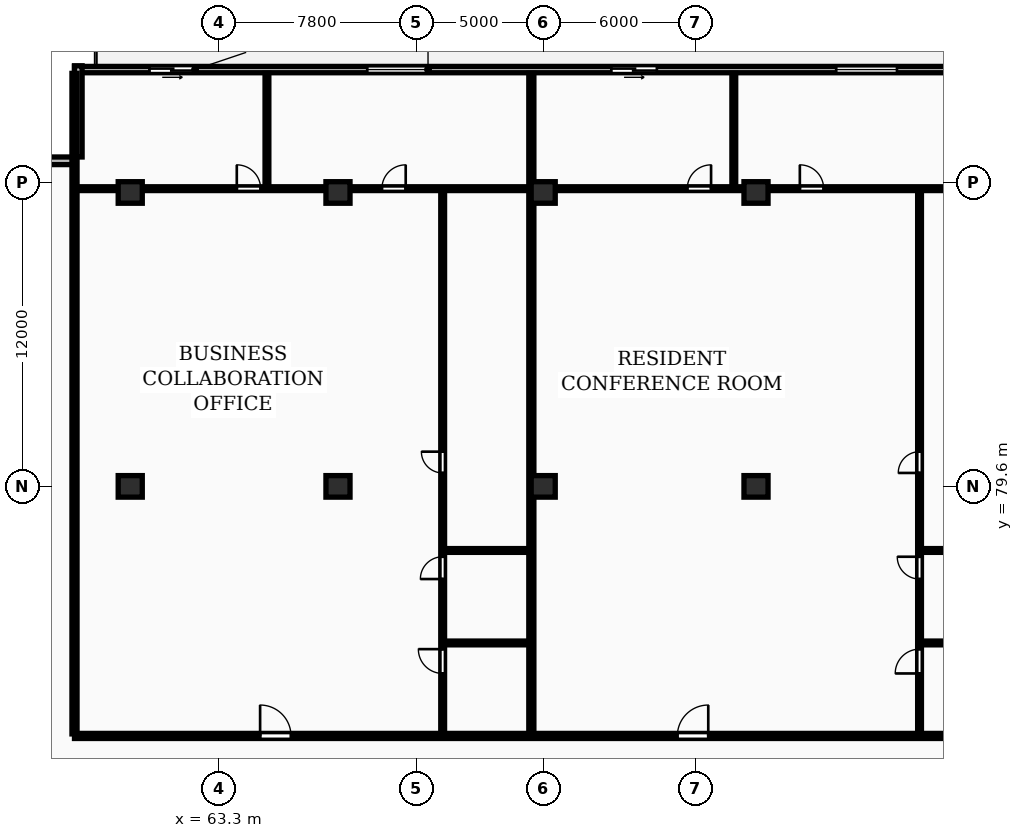
"""IFC4 building model, lengths in metres.
Left out: names, types, materials, properties, quantities, classifications, styles, units other than length and angle.
Written with IfcOpenShell. Run it as: python <this file> out.ifc"""

import sys

from ifc_helpers import new_model, si_unit, direction, frame, frame_2d, origin, origin_2d, place, context, subcontext, project, spatial, rectangle, extrude, element, fill, save


model = new_model("IFC4")
c1 = context("Model", 3, precision=1e-05, world=origin(), true_north=direction((0.0, 1.0)))
c2 = subcontext(c1, "Body", "Model", "MODEL_VIEW")
j1 = project(units=[si_unit("LENGTHUNIT", "METRE"), si_unit("PLANEANGLEUNIT", "RADIAN")], contexts=[c1])
p1 = place(None, origin())
s1 = spatial("IfcSite", under=j1, at=p1, CompositionType="ELEMENT")
p2 = place(p1, origin())
s2 = spatial("IfcBuilding", under=s1, at=p2, CompositionType="ELEMENT")
p3 = place(p2, frame((0.0, 0.0, 100.3)))
s3 = spatial("IfcBuildingStorey", under=s2, at=p3, CompositionType="ELEMENT", Elevation=100.3)
for number, where, z_axis, x_axis in (
    (1, (59.8, 79.6, 0.0), (0.0, 0.0, 1.0), (1.0, 0.0, 0.0)),
    (2, (59.8, 91.2, 0.0), (0.0, 0.0, 1.0), (1.0, 0.0, 0.0)),
    (3, (68.0, 79.6, 0.0), (0.0, 0.0, 1.0), (1.0, 0.0, 0.0)),
    (4, (68.0, 91.2, 0.0), (0.0, 0.0, 1.0), (1.0, 0.0, 0.0)),
    (5, (76.1, 79.6, 0.0), (0.0, 0.0, 1.0), (1.0, 0.0, 0.0)),
    (6, (76.1, 91.2, 0.0), (0.0, 0.0, 1.0), (1.0, 0.0, 0.0)),
    (7, (84.5, 79.6, 0.0), (0.0, 0.0, 1.0), (1.0, 0.0, 0.0)),
    (8, (84.5, 91.2, 0.0), (0.0, 0.0, 1.0), (1.0, 0.0, 0.0)),
):
    element("IfcColumn", number, at=place(p3, frame(where, z_axis=z_axis, x_axis=x_axis)), inside=s3, PredefinedType="COLUMN", context=c2, shape_type="SweptSolid", body=[
        extrude(rectangle(XDim=0.95, YDim=0.85, at=origin_2d()), origin(), (0.0, 0.0, 1.0), 3.25),
    ])
p4 = place(p3, frame((130.6, 96.05, 0.0), z_axis=(0.0, 0.0, 1.0), x_axis=(-1.0, 0.0, 0.0)))
e9 = element("IfcWall", 9, at=p4, inside=s3, PredefinedType="STANDARD", context=c2, shape_type="SweptSolid", body=[
    extrude(rectangle(XDim=73.0, YDim=0.25, at=frame_2d((36.5, 0.0))), origin(), (0.0, 0.0, 1.0), 2.97),
])
p5 = place(p4, frame((68.242, 0.0, 0.0)))
e10 = element("IfcOpeningElement", 10, at=p5, cuts=e9, PredefinedType="OPENING", context=c2, shape_type="SweptSolid", body=[
    extrude(rectangle(XDim=1.8, YDim=2.2, at=frame_2d((0.9, 1.1))), frame((0.0, 0.135, 0.0), z_axis=(0.0, -1.0, 0.0), x_axis=(1.0, 0.0, 0.0)), (0.0, 0.0, 1.0), 0.27),
])
p6 = place(p4, frame((59.046, 0.0, 0.85)))
e11 = element("IfcOpeningElement", 11, at=p6, cuts=e9, PredefinedType="OPENING", context=c2, shape_type="SweptSolid", body=[
    extrude(rectangle(XDim=2.4, YDim=1.9, at=frame_2d((1.2, 0.95))), frame((0.0, 0.135, 0.0), z_axis=(0.0, -1.0, 0.0), x_axis=(1.0, 0.0, 0.0)), (0.0, 0.0, 1.0), 0.27),
])
p7 = place(p4, frame((50.012, 0.0, 0.0)))
e12 = element("IfcOpeningElement", 12, at=p7, cuts=e9, PredefinedType="OPENING", context=c2, shape_type="SweptSolid", body=[
    extrude(rectangle(XDim=1.8, YDim=2.2, at=frame_2d((0.9, 1.1))), frame((0.0, 0.135, 0.0), z_axis=(0.0, -1.0, 0.0), x_axis=(1.0, 0.0, 0.0)), (0.0, 0.0, 1.0), 0.27),
])
p8 = place(p4, frame((40.536, 0.0, 0.85)))
e13 = element("IfcOpeningElement", 13, at=p8, cuts=e9, PredefinedType="OPENING", context=c2, shape_type="SweptSolid", body=[
    extrude(rectangle(XDim=2.4, YDim=1.9, at=frame_2d((1.2, 0.95))), frame((0.0, 0.135, 0.0), z_axis=(0.0, -1.0, 0.0), x_axis=(1.0, 0.0, 0.0)), (0.0, 0.0, 1.0), 0.27),
])
p9 = place(p4, frame((30.67, 0.0, 0.0)))
e14 = element("IfcOpeningElement", 14, at=p9, cuts=e9, PredefinedType="OPENING", context=c2, shape_type="SweptSolid", body=[
    extrude(rectangle(XDim=1.8, YDim=2.2, at=frame_2d((0.9, 1.1))), frame((0.0, 0.135, 0.0), z_axis=(0.0, -1.0, 0.0), x_axis=(1.0, 0.0, 0.0)), (0.0, 0.0, 1.0), 0.27),
])
p10 = place(p4, frame((20.781, 0.0, 0.0)))
e15 = element("IfcOpeningElement", 15, at=p10, cuts=e9, PredefinedType="OPENING", context=c2, shape_type="SweptSolid", body=[
    extrude(rectangle(XDim=1.8, YDim=2.2, at=frame_2d((0.9, 1.1))), frame((0.0, 0.135, 0.0), z_axis=(0.0, -1.0, 0.0), x_axis=(1.0, 0.0, 0.0)), (0.0, 0.0, 1.0), 0.27),
])
p11 = place(p4, frame((9.423, 0.0, 0.85)))
e16 = element("IfcOpeningElement", 16, at=p11, cuts=e9, PredefinedType="OPENING", context=c2, shape_type="SweptSolid", body=[
    extrude(rectangle(XDim=1.8, YDim=1.8, at=frame_2d((0.9, 0.9))), frame((0.0, 0.135, 0.0), z_axis=(0.0, -1.0, 0.0), x_axis=(1.0, 0.0, 0.0)), (0.0, 0.0, 1.0), 0.27),
])
p12 = place(p4, frame((5.66, 0.0, 0.85)))
e17 = element("IfcOpeningElement", 17, at=p12, cuts=e9, PredefinedType="OPENING", context=c2, shape_type="SweptSolid", body=[
    extrude(rectangle(XDim=1.8, YDim=1.8, at=frame_2d((0.9, 0.9))), frame((0.0, 0.135, 0.0), z_axis=(0.0, -1.0, 0.0), x_axis=(1.0, 0.0, 0.0)), (0.0, 0.0, 1.0), 0.27),
])
p13 = place(p4, frame((13.451, 0.0, 0.0)))
e18 = element("IfcOpeningElement", 18, at=p13, cuts=e9, PredefinedType="OPENING", context=c2, shape_type="SweptSolid", body=[
    extrude(rectangle(XDim=1.8, YDim=2.2, at=frame_2d((0.9, 1.1))), frame((0.0, 0.135, 0.0), z_axis=(0.0, -1.0, 0.0), x_axis=(1.0, 0.0, 0.0)), (0.0, 0.0, 1.0), 0.27),
])
p14 = place(p4, frame((1.21, 0.0, 0.85)))
e19 = element("IfcOpeningElement", 19, at=p14, cuts=e9, PredefinedType="OPENING", context=c2, shape_type="SweptSolid", body=[
    extrude(rectangle(XDim=2.4, YDim=1.9, at=frame_2d((1.2, 0.95))), frame((0.0, 0.135, 0.0), z_axis=(0.0, -1.0, 0.0), x_axis=(1.0, 0.0, 0.0)), (0.0, 0.0, 1.0), 0.27),
])
p15 = place(p3, frame((57.75, 96.2, 0.0), z_axis=(0.0, 0.0, 1.0), x_axis=(0.0, -1.0, 0.0)))
e20 = element("IfcWall", 20, at=p15, inside=s3, PredefinedType="STANDARD", context=c2, shape_type="SweptSolid", body=[
    extrude(rectangle(XDim=3.6, YDim=0.3, at=frame_2d((1.8, 0.0))), origin(), (0.0, 0.0, 1.0), 2.97),
])
p16 = place(p3, frame((57.6, 92.45, 0.0), z_axis=(0.0, 0.0, 1.0), x_axis=(-1.0, 0.0, 0.0)))
e21 = element("IfcWall", 21, at=p16, inside=s3, PredefinedType="STANDARD", context=c2, shape_type="SweptSolid", body=[
    extrude(rectangle(XDim=3.6, YDim=0.3, at=frame_2d((1.8, 0.0))), origin(), (0.0, 0.0, 1.0), 2.97),
])
for number, where, z_axis, x_axis in (
    (22, (57.6, 69.83, 0.0), (0.0, 0.0, 1.0), (0.0, 1.0, 0.0)),
    (23, (75.632, 69.83, 0.0), (0.0, 0.0, 1.0), (0.0, 1.0, 0.0)),
):
    element("IfcWall", number, at=place(p3, frame(where, z_axis=z_axis, x_axis=x_axis)), inside=s3, PredefinedType="PARTITIONING", context=c2, shape_type="SweptSolid", body=[
        extrude(rectangle(XDim=26.07, YDim=0.2, at=frame_2d((13.035, 0.0))), origin(), (0.0, 0.0, 1.0), 2.97),
    ])
for number, where, z_axis, x_axis in (
    (24, (72.192, 73.42, 0.0), (0.0, 0.0, 1.0), (1.0, 0.0, 0.0)),
    (25, (72.192, 77.07, 0.0), (0.0, 0.0, 1.0), (1.0, 0.0, 0.0)),
):
    element("IfcWall", number, at=place(p3, frame(where, z_axis=z_axis, x_axis=x_axis)), inside=s3, PredefinedType="PARTITIONING", context=c2, shape_type="SweptSolid", body=[
        extrude(rectangle(XDim=3.36, YDim=0.15, at=frame_2d((1.68, 0.0))), origin(), (0.0, 0.0, 1.0), 2.97),
    ])
p17 = place(p3, frame((72.132, 69.81, 0.0), z_axis=(0.0, 0.0, 1.0), x_axis=(0.0, 1.0, 0.0)))
e26 = element("IfcWall", 26, at=p17, inside=s3, PredefinedType="PARTITIONING", context=c2, shape_type="SweptSolid", body=[
    extrude(rectangle(XDim=21.48, YDim=0.15, at=frame_2d((10.74, 0.0))), origin(), (0.0, 0.0, 1.0), 2.97),
])
p18 = place(p17, frame((2.406, 0.0, 0.0)))
e27 = element("IfcOpeningElement", 27, at=p18, cuts=e26, PredefinedType="OPENING", context=c2, shape_type="SweptSolid", body=[
    extrude(rectangle(XDim=0.96, YDim=2.1, at=frame_2d((0.48, 1.05))), frame((0.0, 0.085, 0.0), z_axis=(0.0, -1.0, 0.0), x_axis=(1.0, 0.0, 0.0)), (0.0, 0.0, 1.0), 0.17),
])
p19 = place(p17, frame((6.133, 0.0, 0.0)))
e28 = element("IfcOpeningElement", 28, at=p19, cuts=e26, PredefinedType="OPENING", context=c2, shape_type="SweptSolid", body=[
    extrude(rectangle(XDim=0.88, YDim=2.06, at=frame_2d((0.44, 1.03))), frame((0.0, 0.085, 0.0), z_axis=(0.0, -1.0, 0.0), x_axis=(1.0, 0.0, 0.0)), (0.0, 0.0, 1.0), 0.17),
])
p20 = place(p17, frame((10.32, 0.0, 0.0)))
e29 = element("IfcOpeningElement", 29, at=p20, cuts=e26, PredefinedType="OPENING", context=c2, shape_type="SweptSolid", body=[
    extrude(rectangle(XDim=0.84, YDim=2.04, at=frame_2d((0.42, 1.02))), frame((0.0, 0.085, 0.0), z_axis=(0.0, -1.0, 0.0), x_axis=(1.0, 0.0, 0.0)), (0.0, 0.0, 1.0), 0.17),
])
p21 = place(p3, frame((65.196, 91.43, 0.0), z_axis=(0.0, 0.0, 1.0), x_axis=(0.0, 1.0, 0.0)))
e30 = element("IfcWall", 30, at=p21, inside=s3, PredefinedType="PARTITIONING", context=c2, shape_type="SweptSolid", body=[
    extrude(rectangle(XDim=4.47, YDim=0.15, at=frame_2d((2.235, 0.0))), origin(), (0.0, 0.0, 1.0), 2.97),
])
p22 = place(p3, frame((57.68, 91.35, 0.0), z_axis=(0.0, 0.0, 1.0), x_axis=(1.0, 0.0, 0.0)))
e31 = element("IfcWall", 31, at=p22, inside=s3, PredefinedType="PARTITIONING", context=c2, shape_type="SweptSolid", body=[
    extrude(rectangle(XDim=17.872, YDim=0.15, at=frame_2d((8.936, 0.0))), origin(), (0.0, 0.0, 1.0), 2.663),
])
p23 = place(p22, frame((6.326, 0.0, 0.0)))
e32 = element("IfcOpeningElement", 32, at=p23, cuts=e31, PredefinedType="OPENING", context=c2, shape_type="SweptSolid", body=[
    extrude(rectangle(XDim=0.94, YDim=2.1, at=frame_2d((0.47, 1.05))), frame((0.0, 0.085, 0.0), z_axis=(0.0, -1.0, 0.0), x_axis=(1.0, 0.0, 0.0)), (0.0, 0.0, 1.0), 0.17),
])
p24 = place(p22, frame((12.053, 0.0, 0.0)))
e33 = element("IfcOpeningElement", 33, at=p24, cuts=e31, PredefinedType="OPENING", context=c2, shape_type="SweptSolid", body=[
    extrude(rectangle(XDim=0.94, YDim=2.1, at=frame_2d((0.47, 1.05))), frame((0.0, 0.085, 0.0), z_axis=(0.0, -1.0, 0.0), x_axis=(1.0, 0.0, 0.0)), (0.0, 0.0, 1.0), 0.17),
])
for number, where, z_axis, x_axis in (
    (34, (91.015, 73.42, 0.0), (0.0, 0.0, 1.0), (1.0, 0.0, 0.0)),
    (35, (91.015, 77.07, 0.0), (0.0, 0.0, 1.0), (1.0, 0.0, 0.0)),
):
    element("IfcWall", number, at=place(p3, frame(where, z_axis=z_axis, x_axis=x_axis)), inside=s3, PredefinedType="PARTITIONING", context=c2, shape_type="SweptSolid", body=[
        extrude(rectangle(XDim=3.13, YDim=0.15, at=frame_2d((1.565, 0.0))), origin(), (0.0, 0.0, 1.0), 2.97),
    ])
p25 = place(p3, frame((90.955, 69.81, 0.0), z_axis=(0.0, 0.0, 1.0), x_axis=(0.0, 1.0, 0.0)))
e36 = element("IfcWall", 36, at=p25, inside=s3, PredefinedType="PARTITIONING", context=c2, shape_type="SweptSolid", body=[
    extrude(rectangle(XDim=21.48, YDim=0.15, at=frame_2d((10.74, 0.0))), origin(), (0.0, 0.0, 1.0), 2.97),
])
p26 = place(p25, frame((2.406, 0.0, 0.0)))
e37 = element("IfcOpeningElement", 37, at=p26, cuts=e36, PredefinedType="OPENING", context=c2, shape_type="SweptSolid", body=[
    extrude(rectangle(XDim=0.96, YDim=2.1, at=frame_2d((0.48, 1.05))), frame((0.0, 0.085, 0.0), z_axis=(0.0, -1.0, 0.0), x_axis=(1.0, 0.0, 0.0)), (0.0, 0.0, 1.0), 0.17),
])
p27 = place(p25, frame((6.133, 0.0, 0.0)))
e38 = element("IfcOpeningElement", 38, at=p27, cuts=e36, PredefinedType="OPENING", context=c2, shape_type="SweptSolid", body=[
    extrude(rectangle(XDim=0.88, YDim=2.06, at=frame_2d((0.44, 1.03))), frame((0.0, 0.085, 0.0), z_axis=(0.0, -1.0, 0.0), x_axis=(1.0, 0.0, 0.0)), (0.0, 0.0, 1.0), 0.17),
])
p28 = place(p25, frame((10.32, 0.0, 0.0)))
e39 = element("IfcOpeningElement", 39, at=p28, cuts=e36, PredefinedType="OPENING", context=c2, shape_type="SweptSolid", body=[
    extrude(rectangle(XDim=0.84, YDim=2.04, at=frame_2d((0.42, 1.02))), frame((0.0, 0.085, 0.0), z_axis=(0.0, -1.0, 0.0), x_axis=(1.0, 0.0, 0.0)), (0.0, 0.0, 1.0), 0.17),
])
p29 = place(p3, frame((83.624, 91.43, 0.0), z_axis=(0.0, 0.0, 1.0), x_axis=(0.0, 1.0, 0.0)))
e40 = element("IfcWall", 40, at=p29, inside=s3, PredefinedType="PARTITIONING", context=c2, shape_type="SweptSolid", body=[
    extrude(rectangle(XDim=4.47, YDim=0.15, at=frame_2d((2.235, 0.0))), origin(), (0.0, 0.0, 1.0), 2.97),
])
p30 = place(p3, frame((75.712, 91.35, 0.0), z_axis=(0.0, 0.0, 1.0), x_axis=(1.0, 0.0, 0.0)))
e41 = element("IfcWall", 41, at=p30, inside=s3, PredefinedType="PARTITIONING", context=c2, shape_type="SweptSolid", body=[
    extrude(rectangle(XDim=18.433, YDim=0.15, at=frame_2d((9.216, 0.0))), origin(), (0.0, 0.0, 1.0), 2.663),
])
p31 = place(p30, frame((6.074, 0.0, 0.0)))
e42 = element("IfcOpeningElement", 42, at=p31, cuts=e41, PredefinedType="OPENING", context=c2, shape_type="SweptSolid", body=[
    extrude(rectangle(XDim=0.94, YDim=2.1, at=frame_2d((0.47, 1.05))), frame((0.0, 0.085, 0.0), z_axis=(0.0, -1.0, 0.0), x_axis=(1.0, 0.0, 0.0)), (0.0, 0.0, 1.0), 0.17),
])
p32 = place(p30, frame((10.518, 0.0, 0.0)))
e43 = element("IfcOpeningElement", 43, at=p32, cuts=e41, PredefinedType="OPENING", context=c2, shape_type="SweptSolid", body=[
    extrude(rectangle(XDim=0.94, YDim=2.1, at=frame_2d((0.47, 1.05))), frame((0.0, 0.085, 0.0), z_axis=(0.0, -1.0, 0.0), x_axis=(1.0, 0.0, 0.0)), (0.0, 0.0, 1.0), 0.17),
])
p33 = place(p3, frame((57.6, 69.75, 0.0), z_axis=(0.0, 0.0, 1.0), x_axis=(1.0, 0.0, 0.0)))
e44 = element("IfcWall", 44, at=p33, inside=s3, PredefinedType="PARTITIONING", context=c2, shape_type="SweptSolid", body=[
    extrude(rectangle(XDim=73.0, YDim=0.2, at=frame_2d((36.5, 0.0))), origin(), (0.0, 0.0, 1.0), 2.97),
])
p34 = place(p33, frame((7.326, 0.0, 0.0)))
e45 = element("IfcOpeningElement", 45, at=p34, cuts=e44, PredefinedType="OPENING", context=c2, shape_type="SweptSolid", body=[
    extrude(rectangle(XDim=1.22, YDim=2.18, at=frame_2d((0.61, 1.09))), frame((0.0, 0.11, 0.0), z_axis=(0.0, -1.0, 0.0), x_axis=(1.0, 0.0, 0.0)), (0.0, 0.0, 1.0), 0.22),
])
p35 = place(p33, frame((23.795, 0.0, 0.0)))
e46 = element("IfcOpeningElement", 46, at=p35, cuts=e44, PredefinedType="OPENING", context=c2, shape_type="SweptSolid", body=[
    extrude(rectangle(XDim=1.22, YDim=2.18, at=frame_2d((0.61, 1.09))), frame((0.0, 0.11, 0.0), z_axis=(0.0, -1.0, 0.0), x_axis=(1.0, 0.0, 0.0)), (0.0, 0.0, 1.0), 0.22),
])
p36 = place(p33, frame((38.67, 0.0, 0.0)))
e47 = element("IfcOpeningElement", 47, at=p36, cuts=e44, PredefinedType="OPENING", context=c2, shape_type="SweptSolid", body=[
    extrude(rectangle(XDim=0.95, YDim=2.15, at=frame_2d((0.475, 1.075))), frame((0.0, 0.11, 0.0), z_axis=(0.0, -1.0, 0.0), x_axis=(1.0, 0.0, 0.0)), (0.0, 0.0, 1.0), 0.22),
])
p37 = place(p33, frame((48.279, 0.0, 0.0)))
e48 = element("IfcOpeningElement", 48, at=p37, cuts=e44, PredefinedType="OPENING", context=c2, shape_type="SweptSolid", body=[
    extrude(rectangle(XDim=0.95, YDim=2.15, at=frame_2d((0.475, 1.075))), frame((0.0, 0.11, 0.0), z_axis=(0.0, -1.0, 0.0), x_axis=(1.0, 0.0, 0.0)), (0.0, 0.0, 1.0), 0.22),
])
p38 = place(p33, frame((58.449, 0.0, 0.0)))
e49 = element("IfcOpeningElement", 49, at=p38, cuts=e44, PredefinedType="OPENING", context=c2, shape_type="SweptSolid", body=[
    extrude(rectangle(XDim=0.95, YDim=2.15, at=frame_2d((0.475, 1.075))), frame((0.0, 0.11, 0.0), z_axis=(0.0, -1.0, 0.0), x_axis=(1.0, 0.0, 0.0)), (0.0, 0.0, 1.0), 0.22),
])
p39 = place(p5, origin())
e50 = element("IfcDoor", 50, at=p39, inside=s3, OperationType="SLIDING_TO_LEFT", PredefinedType="DOOR", context=c2, shape_type="SweptSolid", body=[
    extrude(rectangle(XDim=1.8, YDim=2.2, at=frame_2d((0.9, 1.1))), frame((0.0, 0.025, 0.0), z_axis=(0.0, -1.0, 0.0), x_axis=(1.0, 0.0, 0.0)), (0.0, 0.0, 1.0), 0.05),
])
fill(e10, e50)
p40 = place(p6, origin())
e51 = element("IfcWindow", 51, at=p40, inside=s3, PartitioningType="DOUBLE_PANEL_VERTICAL", PredefinedType="WINDOW", context=c2, shape_type="SweptSolid", body=[
    extrude(rectangle(XDim=2.4, YDim=1.9, at=frame_2d((1.2, 0.95))), frame((0.0, 0.03, 0.0), z_axis=(0.0, -1.0, 0.0), x_axis=(1.0, 0.0, 0.0)), (0.0, 0.0, 1.0), 0.06),
])
fill(e11, e51)
p41 = place(p7, origin())
e52 = element("IfcDoor", 52, at=p41, inside=s3, OperationType="SLIDING_TO_LEFT", PredefinedType="DOOR", context=c2, shape_type="SweptSolid", body=[
    extrude(rectangle(XDim=1.8, YDim=2.2, at=frame_2d((0.9, 1.1))), frame((0.0, 0.025, 0.0), z_axis=(0.0, -1.0, 0.0), x_axis=(1.0, 0.0, 0.0)), (0.0, 0.0, 1.0), 0.05),
])
fill(e12, e52)
p42 = place(p8, origin())
e53 = element("IfcWindow", 53, at=p42, inside=s3, PartitioningType="DOUBLE_PANEL_VERTICAL", PredefinedType="WINDOW", context=c2, shape_type="SweptSolid", body=[
    extrude(rectangle(XDim=2.4, YDim=1.9, at=frame_2d((1.2, 0.95))), frame((0.0, 0.03, 0.0), z_axis=(0.0, -1.0, 0.0), x_axis=(1.0, 0.0, 0.0)), (0.0, 0.0, 1.0), 0.06),
])
fill(e13, e53)
p43 = place(p18, origin())
e54 = element("IfcDoor", 54, at=p43, inside=s3, OperationType="SINGLE_SWING_RIGHT", PredefinedType="DOOR", context=c2, shape_type="SweptSolid", body=[
    extrude(rectangle(XDim=0.96, YDim=2.1, at=frame_2d((0.48, 1.05))), frame((0.0, 0.025, 0.0), z_axis=(0.0, -1.0, 0.0), x_axis=(1.0, 0.0, 0.0)), (0.0, 0.0, 1.0), 0.05),
])
fill(e27, e54)
p44 = place(p19, origin())
e55 = element("IfcDoor", 55, at=p44, inside=s3, OperationType="SINGLE_SWING_LEFT", PredefinedType="DOOR", context=c2, shape_type="SweptSolid", body=[
    extrude(rectangle(XDim=0.88, YDim=2.06, at=frame_2d((0.44, 1.03))), frame((0.0, 0.025, 0.0), z_axis=(0.0, -1.0, 0.0), x_axis=(1.0, 0.0, 0.0)), (0.0, 0.0, 1.0), 0.05),
])
fill(e28, e55)
p45 = place(p20, origin())
e56 = element("IfcDoor", 56, at=p45, inside=s3, OperationType="SINGLE_SWING_RIGHT", PredefinedType="DOOR", context=c2, shape_type="SweptSolid", body=[
    extrude(rectangle(XDim=0.84, YDim=2.04, at=frame_2d((0.42, 1.02))), frame((0.0, 0.025, 0.0), z_axis=(0.0, -1.0, 0.0), x_axis=(1.0, 0.0, 0.0)), (0.0, 0.0, 1.0), 0.05),
])
fill(e29, e56)
p46 = place(p23, origin())
e57 = element("IfcDoor", 57, at=p46, inside=s3, OperationType="SINGLE_SWING_LEFT", PredefinedType="DOOR", context=c2, shape_type="SweptSolid", body=[
    extrude(rectangle(XDim=0.94, YDim=2.1, at=frame_2d((0.47, 1.05))), frame((0.0, 0.025, 0.0), z_axis=(0.0, -1.0, 0.0), x_axis=(1.0, 0.0, 0.0)), (0.0, 0.0, 1.0), 0.05),
])
fill(e32, e57)
p47 = place(p24, origin())
e58 = element("IfcDoor", 58, at=p47, inside=s3, OperationType="SINGLE_SWING_RIGHT", PredefinedType="DOOR", context=c2, shape_type="SweptSolid", body=[
    extrude(rectangle(XDim=0.94, YDim=2.1, at=frame_2d((0.47, 1.05))), frame((0.0, 0.025, 0.0), z_axis=(0.0, -1.0, 0.0), x_axis=(1.0, 0.0, 0.0)), (0.0, 0.0, 1.0), 0.05),
])
fill(e33, e58)
p48 = place(p26, origin())
e59 = element("IfcDoor", 59, at=p48, inside=s3, OperationType="SINGLE_SWING_LEFT", PredefinedType="DOOR", context=c2, shape_type="SweptSolid", body=[
    extrude(rectangle(XDim=0.96, YDim=2.1, at=frame_2d((0.48, 1.05))), frame((0.0, 0.025, 0.0), z_axis=(0.0, -1.0, 0.0), x_axis=(1.0, 0.0, 0.0)), (0.0, 0.0, 1.0), 0.05),
])
fill(e37, e59)
p49 = place(p27, origin())
e60 = element("IfcDoor", 60, at=p49, inside=s3, OperationType="SINGLE_SWING_RIGHT", PredefinedType="DOOR", context=c2, shape_type="SweptSolid", body=[
    extrude(rectangle(XDim=0.88, YDim=2.06, at=frame_2d((0.44, 1.03))), frame((0.0, 0.025, 0.0), z_axis=(0.0, -1.0, 0.0), x_axis=(1.0, 0.0, 0.0)), (0.0, 0.0, 1.0), 0.05),
])
fill(e38, e60)
p50 = place(p28, origin())
e61 = element("IfcDoor", 61, at=p50, inside=s3, OperationType="SINGLE_SWING_LEFT", PredefinedType="DOOR", context=c2, shape_type="SweptSolid", body=[
    extrude(rectangle(XDim=0.84, YDim=2.04, at=frame_2d((0.42, 1.02))), frame((0.0, 0.025, 0.0), z_axis=(0.0, -1.0, 0.0), x_axis=(1.0, 0.0, 0.0)), (0.0, 0.0, 1.0), 0.05),
])
fill(e39, e61)
p51 = place(p31, origin())
e62 = element("IfcDoor", 62, at=p51, inside=s3, OperationType="SINGLE_SWING_RIGHT", PredefinedType="DOOR", context=c2, shape_type="SweptSolid", body=[
    extrude(rectangle(XDim=0.94, YDim=2.1, at=frame_2d((0.47, 1.05))), frame((0.0, 0.025, 0.0), z_axis=(0.0, -1.0, 0.0), x_axis=(1.0, 0.0, 0.0)), (0.0, 0.0, 1.0), 0.05),
])
fill(e42, e62)
p52 = place(p32, origin())
e63 = element("IfcDoor", 63, at=p52, inside=s3, OperationType="SINGLE_SWING_LEFT", PredefinedType="DOOR", context=c2, shape_type="SweptSolid", body=[
    extrude(rectangle(XDim=0.94, YDim=2.1, at=frame_2d((0.47, 1.05))), frame((0.0, 0.025, 0.0), z_axis=(0.0, -1.0, 0.0), x_axis=(1.0, 0.0, 0.0)), (0.0, 0.0, 1.0), 0.05),
])
fill(e43, e63)
p53 = place(p34, origin())
e64 = element("IfcDoor", 64, at=p53, inside=s3, OperationType="SINGLE_SWING_LEFT", PredefinedType="DOOR", context=c2, shape_type="SweptSolid", body=[
    extrude(rectangle(XDim=1.22, YDim=2.18, at=frame_2d((0.61, 1.09))), frame((0.0, 0.025, 0.0), z_axis=(0.0, -1.0, 0.0), x_axis=(1.0, 0.0, 0.0)), (0.0, 0.0, 1.0), 0.05),
])
fill(e45, e64)
p54 = place(p35, origin())
e65 = element("IfcDoor", 65, at=p54, inside=s3, OperationType="SINGLE_SWING_RIGHT", PredefinedType="DOOR", context=c2, shape_type="SweptSolid", body=[
    extrude(rectangle(XDim=1.22, YDim=2.18, at=frame_2d((0.61, 1.09))), frame((0.0, 0.025, 0.0), z_axis=(0.0, -1.0, 0.0), x_axis=(1.0, 0.0, 0.0)), (0.0, 0.0, 1.0), 0.05),
])
fill(e46, e65)
save(model, sys.argv[1])
